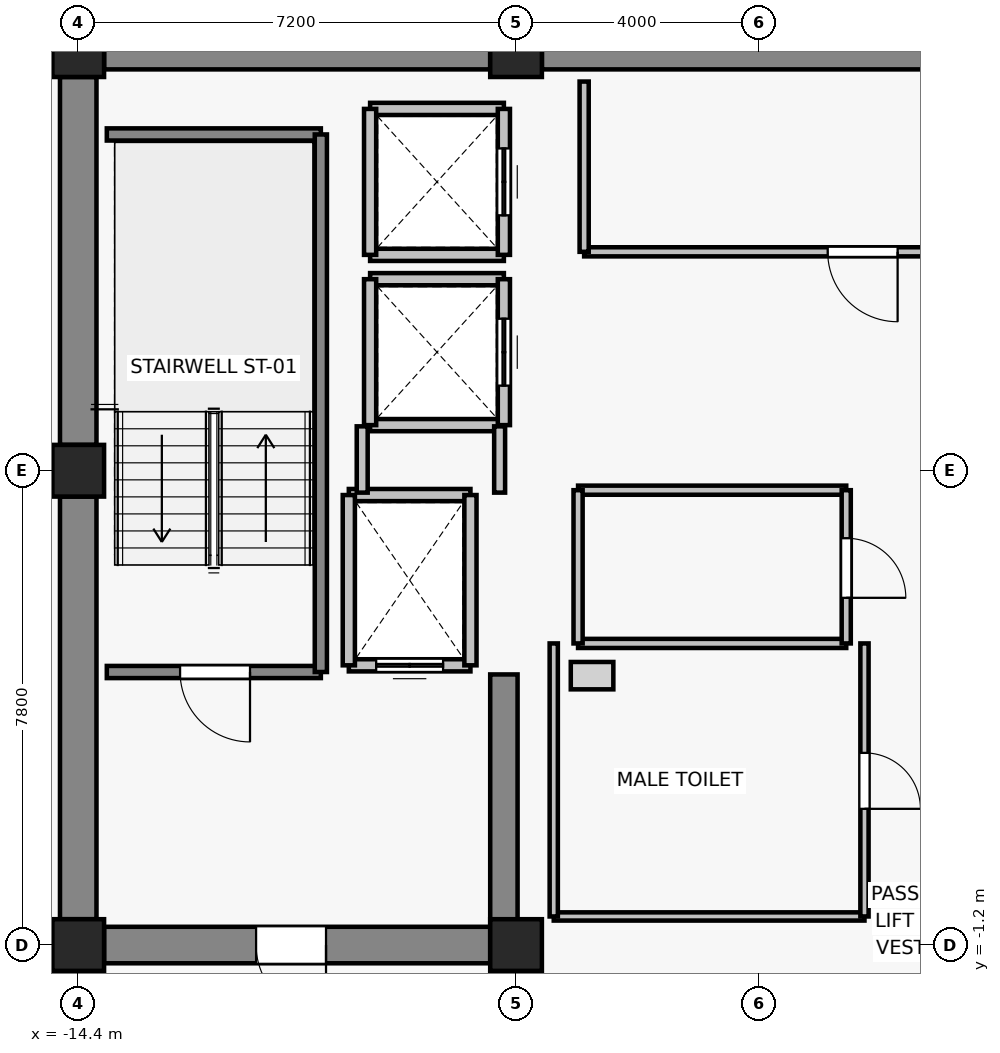
"""IFC4 building model, lengths in metres.
Left out: names, types, materials, properties, quantities, classifications, styles, units other than length and angle.
Written with IfcOpenShell. Run it as: python <this file> out.ifc"""

import sys

from ifc_helpers import new_model, si_unit, direction, frame, frame_2d, origin, origin_2d, place, context, subcontext, project, spatial, rectangle, extrude, source, transform, mapped, element, fill, save


model = new_model("IFC4")
c1 = context("Model", 3, precision=1e-05, world=origin(), true_north=direction((0.0, 1.0)))
c2 = subcontext(c1, "Body", "Model", "MODEL_VIEW")
j1 = project(units=[si_unit("LENGTHUNIT", "METRE"), si_unit("PLANEANGLEUNIT", "RADIAN")], contexts=[c1])
p1 = place(None, origin())
s1 = spatial("IfcSite", under=j1, at=p1, CompositionType="ELEMENT")
p2 = place(p1, origin())
s2 = spatial("IfcBuilding", under=s1, at=p2, CompositionType="ELEMENT")
p3 = place(p2, frame((0.0, 0.0, 205.6)))
s3 = spatial("IfcBuildingStorey", under=s2, at=p3, CompositionType="ELEMENT", Elevation=205.6)
for number, where, z_axis, x_axis in (
    (1, (-14.4, -1.2, 0.0), (0.0, 0.0, 1.0), (1.0, 0.0, 0.0)),
    (2, (-7.2, -1.2, 0.0), (0.0, 0.0, 1.0), (1.0, 0.0, 0.0)),
    (3, (-14.4, 6.6, 0.0), (0.0, 0.0, 1.0), (1.0, 0.0, 0.0)),
    (4, (-14.4, 13.5, 0.0), (0.0, 0.0, 1.0), (1.0, 0.0, 0.0)),
    (5, (-7.2, 13.5, 0.0), (0.0, 0.0, 1.0), (1.0, 0.0, 0.0)),
):
    element("IfcColumn", number, at=place(p3, frame(where, z_axis=z_axis, x_axis=x_axis)), inside=s3, PredefinedType="COLUMN", context=c2, shape_type="SweptSolid", body=[
        extrude(rectangle(XDim=0.85, YDim=0.85, at=origin_2d()), origin(), (0.0, 0.0, 1.0), 3.3),
    ])
p4 = place(p3, frame((-13.975, 13.5, 0.0), z_axis=(0.0, 0.0, 1.0), x_axis=(1.0, 0.0, 0.0)))
e6 = element("IfcWall", 6, at=p4, inside=s3, PredefinedType="SHEAR", context=c2, shape_type="SweptSolid", body=[
    extrude(rectangle(XDim=6.35, YDim=0.6, at=frame_2d((3.175, 0.0))), origin(), (0.0, 0.0, 1.0), 3.075),
])
p5 = place(p3, frame((-6.775, 13.5, 0.0), z_axis=(0.0, 0.0, 1.0), x_axis=(1.0, 0.0, 0.0)))
e7 = element("IfcWall", 7, at=p5, inside=s3, PredefinedType="SHEAR", context=c2, shape_type="SweptSolid", body=[
    extrude(rectangle(XDim=13.55, YDim=0.6, at=frame_2d((6.775, 0.0))), origin(), (0.0, 0.0, 1.0), 3.075),
])
p6 = place(p3, frame((-14.4, -0.775, 0.0), z_axis=(0.0, 0.0, 1.0), x_axis=(0.0, 1.0, 0.0)))
e8 = element("IfcWall", 8, at=p6, inside=s3, PredefinedType="SHEAR", context=c2, shape_type="SweptSolid", body=[
    extrude(rectangle(XDim=6.95, YDim=0.6, at=frame_2d((3.475, 0.0))), origin(), (0.0, 0.0, 1.0), 3.075),
])
p7 = place(p3, frame((-14.4, 7.025, 0.0), z_axis=(0.0, 0.0, 1.0), x_axis=(0.0, 1.0, 0.0)))
e9 = element("IfcWall", 9, at=p7, inside=s3, PredefinedType="SHEAR", context=c2, shape_type="SweptSolid", body=[
    extrude(rectangle(XDim=6.05, YDim=0.6, at=frame_2d((3.025, 0.0))), origin(), (0.0, 0.0, 1.0), 3.075),
])
p8 = place(p3, frame((-7.625, -1.2, 0.0), z_axis=(0.0, 0.0, 1.0), x_axis=(-1.0, 0.0, 0.0)))
e10 = element("IfcWall", 10, at=p8, inside=s3, PredefinedType="SHEAR", context=c2, shape_type="SweptSolid", body=[
    extrude(rectangle(XDim=6.35, YDim=0.6, at=frame_2d((3.175, 0.0))), origin(), (0.0, 0.0, 1.0), 3.075),
])
p9 = place(p8, frame((2.7, 0.0, 0.0)))
e11 = element("IfcOpeningElement", 11, at=p9, cuts=e10, PredefinedType="OPENING", context=c2, shape_type="SweptSolid", body=[
    extrude(rectangle(XDim=1.15, YDim=2.15, at=frame_2d((0.575, 1.075))), frame((0.0, 0.31, 0.0), z_axis=(0.0, -1.0, 0.0), x_axis=(1.0, 0.0, 0.0)), (0.0, 0.0, 1.0), 0.62),
])
p10 = place(p3, frame((-7.4, -0.9, 0.0), z_axis=(0.0, 0.0, 1.0), x_axis=(0.0, 1.0, 0.0)))
e12 = element("IfcWall", 12, at=p10, inside=s3, PredefinedType="SHEAR", context=c2, shape_type="SweptSolid", body=[
    extrude(rectangle(XDim=4.15, YDim=0.45, at=frame_2d((2.075, 0.0))), origin(), (0.0, 0.0, 1.0), 3.075),
])
p11 = place(p3, frame((-7.95, 3.4, 0.0), z_axis=(0.0, 0.0, 1.0), x_axis=(-1.0, 0.0, 0.0)))
e13 = element("IfcWall", 13, at=p11, inside=s3, PredefinedType="SOLIDWALL", context=c2, shape_type="SweptSolid", body=[
    extrude(rectangle(XDim=2.0, YDim=0.2, at=frame_2d((1.0, 0.0))), origin(), (0.0, 0.0, 1.0), 3.075),
])
p12 = place(p11, frame((0.45, 0.0, 0.0)))
e14 = element("IfcOpeningElement", 14, at=p12, cuts=e13, PredefinedType="OPENING", context=c2, shape_type="SweptSolid", body=[
    extrude(rectangle(XDim=1.1, YDim=2.2, at=frame_2d((0.55, 1.1))), frame((0.0, 0.11, 0.0), z_axis=(0.0, -1.0, 0.0), x_axis=(1.0, 0.0, 0.0)), (0.0, 0.0, 1.0), 0.22),
])
p13 = place(p3, frame((-9.95, 6.2, 0.0), z_axis=(0.0, 0.0, 1.0), x_axis=(1.0, 0.0, 0.0)))
e15 = element("IfcWall", 15, at=p13, inside=s3, PredefinedType="SOLIDWALL", context=c2, shape_type="SweptSolid", body=[
    extrude(rectangle(XDim=2.0, YDim=0.2, at=frame_2d((1.0, 0.0))), origin(), (0.0, 0.0, 1.0), 3.075),
])
for number, where, z_axis, x_axis in (
    (16, (-9.95, 3.4, 0.0), (0.0, 0.0, 1.0), (0.0, 1.0, 0.0)),
    (17, (-7.95, 6.2, 0.0), (0.0, 0.0, 1.0), (0.0, -1.0, 0.0)),
):
    element("IfcWall", number, at=place(p3, frame(where, z_axis=z_axis, x_axis=x_axis)), inside=s3, PredefinedType="SOLIDWALL", context=c2, shape_type="SweptSolid", body=[
        extrude(rectangle(XDim=2.8, YDim=0.2, at=frame_2d((1.4, 0.0))), origin(), (0.0, 0.0, 1.0), 3.075),
    ])
for number, where, z_axis, x_axis in (
    (18, (-7.4, 7.35, 0.0), (0.0, 0.0, 1.0), (-1.0, 0.0, 0.0)),
    (19, (-9.6, 9.75, 0.0), (0.0, 0.0, 1.0), (1.0, 0.0, 0.0)),
):
    element("IfcWall", number, at=place(p3, frame(where, z_axis=z_axis, x_axis=x_axis)), inside=s3, PredefinedType="SOLIDWALL", context=c2, shape_type="SweptSolid", body=[
        extrude(rectangle(XDim=2.2, YDim=0.2, at=frame_2d((1.1, 0.0))), origin(), (0.0, 0.0, 1.0), 2.615),
    ])
p14 = place(p3, frame((-9.6, 7.35, 0.0), z_axis=(0.0, 0.0, 1.0), x_axis=(0.0, 1.0, 0.0)))
e20 = element("IfcWall", 20, at=p14, inside=s3, PredefinedType="SOLIDWALL", context=c2, shape_type="SweptSolid", body=[
    extrude(rectangle(XDim=2.4, YDim=0.2, at=frame_2d((1.2, 0.0))), origin(), (0.0, 0.0, 1.0), 3.075),
])
p15 = place(p3, frame((-7.4, 9.75, 0.0), z_axis=(0.0, 0.0, 1.0), x_axis=(0.0, -1.0, 0.0)))
e21 = element("IfcWall", 21, at=p15, inside=s3, PredefinedType="SOLIDWALL", context=c2, shape_type="SweptSolid", body=[
    extrude(rectangle(XDim=2.4, YDim=0.2, at=frame_2d((1.2, 0.0))), origin(), (0.0, 0.0, 1.0), 2.615),
])
p16 = place(p15, frame((0.65, 0.0, 0.0)))
e22 = element("IfcOpeningElement", 22, at=p16, cuts=e21, PredefinedType="OPENING", context=c2, shape_type="SweptSolid", body=[
    extrude(rectangle(XDim=1.1, YDim=2.2, at=frame_2d((0.55, 1.1))), frame((0.0, 0.11, 0.0), z_axis=(0.0, -1.0, 0.0), x_axis=(1.0, 0.0, 0.0)), (0.0, 0.0, 1.0), 0.22),
])
for number, where, z_axis, x_axis in (
    (23, (-7.4, 10.15, 0.0), (0.0, 0.0, 1.0), (-1.0, 0.0, 0.0)),
    (24, (-9.6, 12.55, 0.0), (0.0, 0.0, 1.0), (1.0, 0.0, 0.0)),
):
    element("IfcWall", number, at=place(p3, frame(where, z_axis=z_axis, x_axis=x_axis)), inside=s3, PredefinedType="SOLIDWALL", context=c2, shape_type="SweptSolid", body=[
        extrude(rectangle(XDim=2.2, YDim=0.2, at=frame_2d((1.1, 0.0))), origin(), (0.0, 0.0, 1.0), 2.615),
    ])
p17 = place(p3, frame((-9.6, 10.15, 0.0), z_axis=(0.0, 0.0, 1.0), x_axis=(0.0, 1.0, 0.0)))
e25 = element("IfcWall", 25, at=p17, inside=s3, PredefinedType="SOLIDWALL", context=c2, shape_type="SweptSolid", body=[
    extrude(rectangle(XDim=2.4, YDim=0.2, at=frame_2d((1.2, 0.0))), origin(), (0.0, 0.0, 1.0), 3.075),
])
p18 = place(p3, frame((-7.4, 12.55, 0.0), z_axis=(0.0, 0.0, 1.0), x_axis=(0.0, -1.0, 0.0)))
e26 = element("IfcWall", 26, at=p18, inside=s3, PredefinedType="SOLIDWALL", context=c2, shape_type="SweptSolid", body=[
    extrude(rectangle(XDim=2.4, YDim=0.2, at=frame_2d((1.2, 0.0))), origin(), (0.0, 0.0, 1.0), 2.615),
])
p19 = place(p18, frame((0.65, 0.0, 0.0)))
e27 = element("IfcOpeningElement", 27, at=p19, cuts=e26, PredefinedType="OPENING", context=c2, shape_type="SweptSolid", body=[
    extrude(rectangle(XDim=1.1, YDim=2.2, at=frame_2d((0.55, 1.1))), frame((0.0, 0.11, 0.0), z_axis=(0.0, -1.0, 0.0), x_axis=(1.0, 0.0, 0.0)), (0.0, 0.0, 1.0), 0.22),
])
p20 = place(p3, frame((-10.41, 3.29, 0.0), z_axis=(0.0, 0.0, 1.0), x_axis=(-1.0, 0.0, 0.0)))
e28 = element("IfcWall", 28, at=p20, inside=s3, PredefinedType="SOLIDWALL", context=c2, shape_type="SweptSolid", body=[
    extrude(rectangle(XDim=3.52, YDim=0.2, at=frame_2d((1.76, 0.0))), origin(), (0.0, 0.0, 1.0), 3.075),
])
p21 = place(p20, frame((1.165, 0.0, 0.0)))
e29 = element("IfcOpeningElement", 29, at=p21, cuts=e28, PredefinedType="OPENING", context=c2, shape_type="SweptSolid", body=[
    extrude(rectangle(XDim=1.15, YDim=2.15, at=frame_2d((0.575, 1.075))), frame((0.0, 0.11, 0.0), z_axis=(0.0, -1.0, 0.0), x_axis=(1.0, 0.0, 0.0)), (0.0, 0.0, 1.0), 0.22),
])
p22 = place(p3, frame((-13.93, 12.13, 0.0), z_axis=(0.0, 0.0, 1.0), x_axis=(1.0, 0.0, 0.0)))
e30 = element("IfcWall", 30, at=p22, inside=s3, PredefinedType="SOLIDWALL", context=c2, shape_type="SweptSolid", body=[
    extrude(rectangle(XDim=3.52, YDim=0.2, at=frame_2d((1.76, 0.0))), origin(), (0.0, 0.0, 1.0), 3.075),
])
p23 = place(p3, frame((-10.41, 12.13, 0.0), z_axis=(0.0, 0.0, 1.0), x_axis=(0.0, -1.0, 0.0)))
e31 = element("IfcWall", 31, at=p23, inside=s3, PredefinedType="SOLIDWALL", context=c2, shape_type="SweptSolid", body=[
    extrude(rectangle(XDim=8.84, YDim=0.2, at=frame_2d((4.42, 0.0))), origin(), (0.0, 0.0, 1.0), 3.075),
])
p24 = place(p3, frame((-9.73, 6.24, 0.0), z_axis=(0.0, 0.0, 1.0), x_axis=(0.0, 1.0, 0.0)))
e32 = element("IfcWall", 32, at=p24, inside=s3, PredefinedType="PARTITIONING", context=c2, shape_type="SweptSolid", body=[
    extrude(rectangle(XDim=1.09, YDim=0.18, at=frame_2d((0.545, 0.0))), origin(), (0.0, 0.0, 1.0), 3.075),
])
p25 = place(p3, frame((-7.47, 7.33, 0.0), z_axis=(0.0, 0.0, 1.0), x_axis=(0.0, -1.0, 0.0)))
e33 = element("IfcWall", 33, at=p25, inside=s3, PredefinedType="PARTITIONING", context=c2, shape_type="SweptSolid", body=[
    extrude(rectangle(XDim=1.09, YDim=0.18, at=frame_2d((0.545, 0.0))), origin(), (0.0, 0.0, 1.0), 2.615),
])
p26 = place(p3, frame((6.08, 10.2, 0.0), z_axis=(0.0, 0.0, 1.0), x_axis=(-1.0, 0.0, 0.0)))
e34 = element("IfcWall", 34, at=p26, inside=s3, PredefinedType="PARTITIONING", context=c2, shape_type="SweptSolid", body=[
    extrude(rectangle(XDim=12.16, YDim=0.15, at=frame_2d((6.08, 0.0))), origin(), (0.0, 0.0, 1.0), 2.59),
])
p27 = place(p26, frame((7.005, 0.0, 0.0)))
e35 = element("IfcOpeningElement", 35, at=p27, cuts=e34, PredefinedType="OPENING", context=c2, shape_type="SweptSolid", body=[
    extrude(rectangle(XDim=1.15, YDim=2.15, at=frame_2d((0.575, 1.075))), frame((0.0, 0.085, 0.0), z_axis=(0.0, -1.0, 0.0), x_axis=(1.0, 0.0, 0.0)), (0.0, 0.0, 1.0), 0.17),
])
p28 = place(p3, frame((-6.08, 10.2, 0.0), z_axis=(0.0, 0.0, 1.0), x_axis=(0.0, 1.0, 0.0)))
e36 = element("IfcWall", 36, at=p28, inside=s3, PredefinedType="PARTITIONING", context=c2, shape_type="SweptSolid", body=[
    extrude(rectangle(XDim=2.8, YDim=0.15, at=frame_2d((1.4, 0.0))), origin(), (0.0, 0.0, 1.0), 3.075),
])
for number, where, z_axis, x_axis in (
    (37, (-1.77, 3.76, 0.0), (0.0, 0.0, 1.0), (-1.0, 0.0, 0.0)),
    (38, (-6.18, 6.28, 0.0), (0.0, 0.0, 1.0), (1.0, 0.0, 0.0)),
):
    element("IfcWall", number, at=place(p3, frame(where, z_axis=z_axis, x_axis=x_axis)), inside=s3, PredefinedType="PARTITIONING", context=c2, shape_type="SweptSolid", body=[
        extrude(rectangle(XDim=4.41, YDim=0.15, at=frame_2d((2.205, 0.0))), origin(), (0.0, 0.0, 1.0), 3.075),
    ])
p29 = place(p3, frame((-6.18, 3.76, 0.0), z_axis=(0.0, 0.0, 1.0), x_axis=(0.0, 1.0, 0.0)))
e39 = element("IfcWall", 39, at=p29, inside=s3, PredefinedType="PARTITIONING", context=c2, shape_type="SweptSolid", body=[
    extrude(rectangle(XDim=2.52, YDim=0.15, at=frame_2d((1.26, 0.0))), origin(), (0.0, 0.0, 1.0), 3.075),
])
p30 = place(p3, frame((-1.77, 6.28, 0.0), z_axis=(0.0, 0.0, 1.0), x_axis=(0.0, -1.0, 0.0)))
e40 = element("IfcWall", 40, at=p30, inside=s3, PredefinedType="PARTITIONING", context=c2, shape_type="SweptSolid", body=[
    extrude(rectangle(XDim=2.52, YDim=0.15, at=frame_2d((1.26, 0.0))), origin(), (0.0, 0.0, 1.0), 3.075),
])
p31 = place(p30, frame((0.79, 0.0, 0.0)))
e41 = element("IfcOpeningElement", 41, at=p31, cuts=e40, PredefinedType="OPENING", context=c2, shape_type="SweptSolid", body=[
    extrude(rectangle(XDim=0.98, YDim=2.15, at=frame_2d((0.49, 1.075))), frame((0.0, 0.085, 0.0), z_axis=(0.0, -1.0, 0.0), x_axis=(1.0, 0.0, 0.0)), (0.0, 0.0, 1.0), 0.17),
])
p32 = place(p3, frame((-1.47, -0.73, 0.0), z_axis=(0.0, 0.0, 1.0), x_axis=(-1.0, 0.0, 0.0)))
e42 = element("IfcWall", 42, at=p32, inside=s3, PredefinedType="PARTITIONING", context=c2, shape_type="SweptSolid", body=[
    extrude(rectangle(XDim=5.11, YDim=0.135, at=frame_2d((2.555, 0.0))), origin(), (0.0, 0.0, 1.0), 3.075),
])
p33 = place(p3, frame((-6.58, -0.73, 0.0), z_axis=(0.0, 0.0, 1.0), x_axis=(0.0, 1.0, 0.0)))
e43 = element("IfcWall", 43, at=p33, inside=s3, PredefinedType="PARTITIONING", context=c2, shape_type="SweptSolid", body=[
    extrude(rectangle(XDim=4.49, YDim=0.135, at=frame_2d((2.245, 0.0))), origin(), (0.0, 0.0, 1.0), 3.075),
])
p34 = place(p3, frame((-1.47, 3.76, 0.0), z_axis=(0.0, 0.0, 1.0), x_axis=(0.0, -1.0, 0.0)))
e44 = element("IfcWall", 44, at=p34, inside=s3, PredefinedType="PARTITIONING", context=c2, shape_type="SweptSolid", body=[
    extrude(rectangle(XDim=4.49, YDim=0.135, at=frame_2d((2.245, 0.0))), origin(), (0.0, 0.0, 1.0), 3.075),
])
p35 = place(p34, frame((1.8, 0.0, 0.0)))
e45 = element("IfcOpeningElement", 45, at=p35, cuts=e44, PredefinedType="OPENING", context=c2, shape_type="SweptSolid", body=[
    extrude(rectangle(XDim=0.92, YDim=2.1, at=frame_2d((0.46, 1.05))), frame((0.0, 0.077, 0.0), z_axis=(0.0, -1.0, 0.0), x_axis=(1.0, 0.0, 0.0)), (0.0, 0.0, 1.0), 0.155),
])
m1 = source(origin(), c2, "Body", "SweptSolid", [
    extrude(rectangle(XDim=1.1, YDim=2.2, at=frame_2d((0.55, 1.1))), frame((0.0, 0.025, 0.0), z_axis=(0.0, -1.0, 0.0), x_axis=(1.0, 0.0, 0.0)), (0.0, 0.0, 1.0), 0.05),
])
p36 = place(p12, origin())
e46 = element("IfcDoor", 46, at=p36, inside=s3, OperationType="DOUBLE_DOOR_SLIDING", PredefinedType="DOOR", context=c2, shape_type="MappedRepresentation", body=[
    mapped(m1, transform((0.0, 0.0, 0.0), x_axis=(1.0, 0.0, 0.0), y_axis=(0.0, 1.0, 0.0), z_axis=(0.0, 0.0, 1.0), scale=1.0)),
])
fill(e14, e46)
p37 = place(p16, origin())
e47 = element("IfcDoor", 47, at=p37, inside=s3, OperationType="DOUBLE_DOOR_SLIDING", PredefinedType="DOOR", context=c2, shape_type="MappedRepresentation", body=[
    mapped(m1, transform((0.0, 0.0, 0.0), x_axis=(1.0, 0.0, 0.0), y_axis=(0.0, 1.0, 0.0), z_axis=(0.0, 0.0, 1.0), scale=1.0)),
])
fill(e22, e47)
p38 = place(p19, origin())
e48 = element("IfcDoor", 48, at=p38, inside=s3, OperationType="DOUBLE_DOOR_SLIDING", PredefinedType="DOOR", context=c2, shape_type="MappedRepresentation", body=[
    mapped(m1, transform((0.0, 0.0, 0.0), x_axis=(1.0, 0.0, 0.0), y_axis=(0.0, 1.0, 0.0), z_axis=(0.0, 0.0, 1.0), scale=1.0)),
])
fill(e27, e48)
m2 = source(origin(), c2, "Body", "SweptSolid", [
    extrude(rectangle(XDim=1.15, YDim=2.15, at=frame_2d((0.575, 1.075))), frame((0.0, 0.025, 0.0), z_axis=(0.0, -1.0, 0.0), x_axis=(1.0, 0.0, 0.0)), (0.0, 0.0, 1.0), 0.05),
])
p39 = place(p21, origin())
e49 = element("IfcDoor", 49, at=p39, inside=s3, OperationType="SINGLE_SWING_LEFT", PredefinedType="DOOR", context=c2, shape_type="MappedRepresentation", body=[
    mapped(m2, transform((0.0, 0.0, 0.0), x_axis=(1.0, 0.0, 0.0), y_axis=(0.0, 1.0, 0.0), z_axis=(0.0, 0.0, 1.0), scale=1.0)),
])
fill(e29, e49)
p40 = place(p9, origin())
e50 = element("IfcDoor", 50, at=p40, inside=s3, OperationType="SINGLE_SWING_LEFT", PredefinedType="DOOR", context=c2, shape_type="MappedRepresentation", body=[
    mapped(m2, transform((0.0, 0.0, 0.0), x_axis=(1.0, 0.0, 0.0), y_axis=(0.0, 1.0, 0.0), z_axis=(0.0, 0.0, 1.0), scale=1.0)),
])
fill(e11, e50)
p41 = place(p27, origin())
e51 = element("IfcDoor", 51, at=p41, inside=s3, OperationType="SINGLE_SWING_LEFT", PredefinedType="DOOR", context=c2, shape_type="MappedRepresentation", body=[
    mapped(m2, transform((0.0, 0.0, 0.0), x_axis=(1.0, 0.0, 0.0), y_axis=(0.0, 1.0, 0.0), z_axis=(0.0, 0.0, 1.0), scale=1.0)),
])
fill(e35, e51)
m3 = source(origin(), c2, "Body", "SweptSolid", [
    extrude(rectangle(XDim=0.98, YDim=2.15, at=frame_2d((0.49, 1.075))), frame((0.0, 0.025, 0.0), z_axis=(0.0, -1.0, 0.0), x_axis=(1.0, 0.0, 0.0)), (0.0, 0.0, 1.0), 0.05),
])
p42 = place(p31, origin())
e52 = element("IfcDoor", 52, at=p42, inside=s3, OperationType="SINGLE_SWING_RIGHT", PredefinedType="DOOR", context=c2, shape_type="MappedRepresentation", body=[
    mapped(m3, transform((0.0, 0.0, 0.0), x_axis=(1.0, 0.0, 0.0), y_axis=(0.0, 1.0, 0.0), z_axis=(0.0, 0.0, 1.0), scale=1.0)),
])
fill(e41, e52)
m4 = source(origin(), c2, "Body", "SweptSolid", [
    extrude(rectangle(XDim=0.92, YDim=2.1, at=frame_2d((0.46, 1.05))), frame((0.0, 0.025, 0.0), z_axis=(0.0, -1.0, 0.0), x_axis=(1.0, 0.0, 0.0)), (0.0, 0.0, 1.0), 0.05),
])
p43 = place(p35, origin())
e53 = element("IfcDoor", 53, at=p43, inside=s3, OperationType="SINGLE_SWING_RIGHT", PredefinedType="DOOR", context=c2, shape_type="MappedRepresentation", body=[
    mapped(m4, transform((0.0, 0.0, 0.0), x_axis=(1.0, 0.0, 0.0), y_axis=(0.0, 1.0, 0.0), z_axis=(0.0, 0.0, 1.0), scale=1.0)),
])
fill(e45, e53)
save(model, sys.argv[1])
